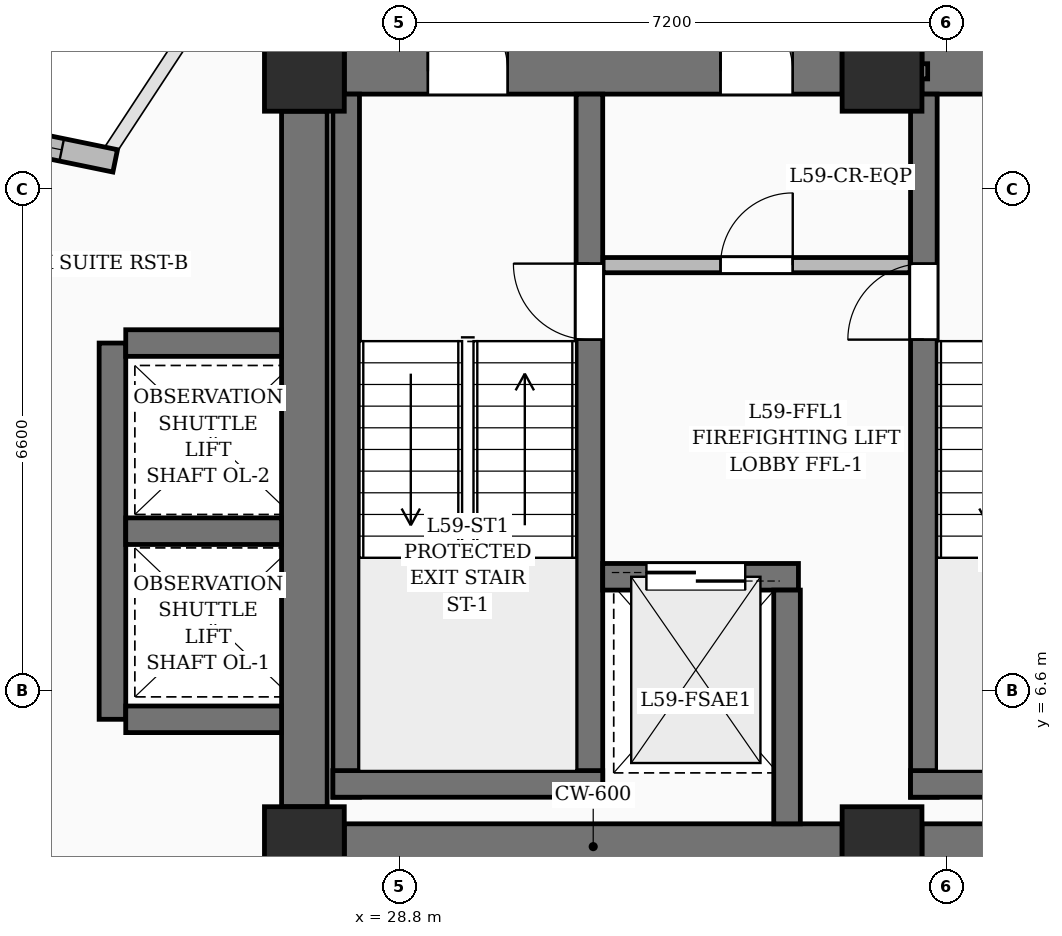
"""IFC4 building model, lengths in metres.
Left out: names, types, materials, properties, quantities, classifications, styles, units other than length and angle.
Written with IfcOpenShell. Run it as: python <this file> out.ifc"""

import sys

from ifc_helpers import new_model, si_unit, direction, frame, frame_2d, origin, origin_2d, place, context, subcontext, project, spatial, rectangle, extrude, element, fill, save


model = new_model("IFC4")
c1 = context("Model", 3, precision=1e-05, world=origin(), true_north=direction((0.0, 1.0)))
c2 = subcontext(c1, "Body", "Model", "MODEL_VIEW")
j1 = project(units=[si_unit("LENGTHUNIT", "METRE"), si_unit("PLANEANGLEUNIT", "RADIAN")], contexts=[c1])
p1 = place(None, origin())
s1 = spatial("IfcSite", under=j1, at=p1, CompositionType="ELEMENT")
p2 = place(p1, origin())
s2 = spatial("IfcBuilding", under=s1, at=p2, CompositionType="ELEMENT")
p3 = place(p2, frame((0.0, 0.0, 229.5)))
s3 = spatial("IfcBuildingStorey", under=s2, at=p3, CompositionType="ELEMENT", Elevation=229.5)
for number, where, z_axis, x_axis in (
    (1, (27.55, 4.55, 0.0), (0.0, 0.0, 1.0), (1.0, 0.0, 0.0)),
    (2, (35.15, 4.55, 0.0), (0.0, 0.0, 1.0), (1.0, 0.0, 0.0)),
    (3, (27.55, 14.75, 0.0), (0.0, 0.0, 1.0), (1.0, 0.0, 0.0)),
    (4, (35.15, 14.75, 0.0), (0.0, 0.0, 1.0), (1.0, 0.0, 0.0)),
):
    element("IfcColumn", number, at=place(p3, frame(where, z_axis=z_axis, x_axis=x_axis)), inside=s3, PredefinedType="COLUMN", context=c2, shape_type="SweptSolid", body=[
        extrude(rectangle(XDim=1.05, YDim=1.05, at=origin_2d()), origin(), (0.0, 0.0, 1.0), 3.75),
    ])
p4 = place(p3, frame((28.075, 4.55, 0.0), z_axis=(0.0, 0.0, 1.0), x_axis=(1.0, 0.0, 0.0)))
e5 = element("IfcWall", 5, at=p4, inside=s3, PredefinedType="SHEAR", context=c2, shape_type="SweptSolid", body=[
    extrude(rectangle(XDim=6.55, YDim=0.6, at=frame_2d((3.275, 0.0))), origin(), (0.0, 0.0, 1.0), 3.75),
])
p5 = place(p3, frame((35.675, 4.55, 0.0), z_axis=(0.0, 0.0, 1.0), x_axis=(1.0, 0.0, 0.0)))
e6 = element("IfcWall", 6, at=p5, inside=s3, PredefinedType="SHEAR", context=c2, shape_type="SweptSolid", body=[
    extrude(rectangle(XDim=10.85, YDim=0.6, at=frame_2d((5.425, 0.0))), origin(), (0.0, 0.0, 1.0), 3.75),
])
p6 = place(p3, frame((28.075, 14.75, 0.0), z_axis=(0.0, 0.0, 1.0), x_axis=(1.0, 0.0, 0.0)))
e7 = element("IfcWall", 7, at=p6, inside=s3, PredefinedType="SHEAR", context=c2, shape_type="SweptSolid", body=[
    extrude(rectangle(XDim=6.55, YDim=0.6, at=frame_2d((3.275, 0.0))), origin(), (0.0, 0.0, 1.0), 3.75),
])
p7 = place(p6, frame((1.1, 0.0, 0.0)))
e8 = element("IfcOpeningElement", 8, at=p7, cuts=e7, PredefinedType="OPENING", context=c2, shape_type="SweptSolid", body=[
    extrude(rectangle(XDim=1.05, YDim=2.15, at=frame_2d((0.525, 1.075))), frame((0.0, 0.31, 0.0), z_axis=(0.0, -1.0, 0.0), x_axis=(1.0, 0.0, 0.0)), (0.0, 0.0, 1.0), 0.62),
])
p8 = place(p6, frame((4.95, 0.0, 0.0)))
e9 = element("IfcOpeningElement", 9, at=p8, cuts=e7, PredefinedType="OPENING", context=c2, shape_type="SweptSolid", body=[
    extrude(rectangle(XDim=0.95, YDim=2.15, at=frame_2d((0.475, 1.075))), frame((0.0, 0.31, 0.0), z_axis=(0.0, -1.0, 0.0), x_axis=(1.0, 0.0, 0.0)), (0.0, 0.0, 1.0), 0.62),
])
p9 = place(p3, frame((35.675, 14.75, 0.0), z_axis=(0.0, 0.0, 1.0), x_axis=(1.0, 0.0, 0.0)))
e10 = element("IfcWall", 10, at=p9, inside=s3, PredefinedType="SHEAR", context=c2, shape_type="SweptSolid", body=[
    extrude(rectangle(XDim=10.85, YDim=0.6, at=frame_2d((5.425, 0.0))), origin(), (0.0, 0.0, 1.0), 3.75),
])
p10 = place(p9, frame((1.1, 0.0, 0.0)))
e11 = element("IfcOpeningElement", 11, at=p10, cuts=e10, PredefinedType="OPENING", context=c2, shape_type="SweptSolid", body=[
    extrude(rectangle(XDim=1.05, YDim=2.15, at=frame_2d((0.525, 1.075))), frame((0.0, 0.31, 0.0), z_axis=(0.0, -1.0, 0.0), x_axis=(1.0, 0.0, 0.0)), (0.0, 0.0, 1.0), 0.62),
])
p11 = place(p9, frame((8.7, 0.0, 0.0)))
e12 = element("IfcOpeningElement", 12, at=p11, cuts=e10, PredefinedType="OPENING", context=c2, shape_type="SweptSolid", body=[
    extrude(rectangle(XDim=1.05, YDim=2.15, at=frame_2d((0.525, 1.075))), frame((0.0, 0.31, 0.0), z_axis=(0.0, -1.0, 0.0), x_axis=(1.0, 0.0, 0.0)), (0.0, 0.0, 1.0), 0.62),
])
p12 = place(p9, frame((3.825, 0.0, 0.0)))
e13 = element("IfcOpeningElement", 13, at=p12, cuts=e10, PredefinedType="OPENING", context=c2, shape_type="SweptSolid", body=[
    extrude(rectangle(XDim=1.2, YDim=2.2, at=frame_2d((0.6, 1.1))), frame((0.0, 0.31, 0.0), z_axis=(0.0, -1.0, 0.0), x_axis=(1.0, 0.0, 0.0)), (0.0, 0.0, 1.0), 0.62),
])
p13 = place(p9, frame((5.825, 0.0, 0.0)))
e14 = element("IfcOpeningElement", 14, at=p13, cuts=e10, PredefinedType="OPENING", context=c2, shape_type="SweptSolid", body=[
    extrude(rectangle(XDim=1.2, YDim=2.2, at=frame_2d((0.6, 1.1))), frame((0.0, 0.31, 0.0), z_axis=(0.0, -1.0, 0.0), x_axis=(1.0, 0.0, 0.0)), (0.0, 0.0, 1.0), 0.62),
])
p14 = place(p3, frame((27.55, 5.075, 0.0), z_axis=(0.0, 0.0, 1.0), x_axis=(0.0, 1.0, 0.0)))
e15 = element("IfcWall", 15, at=p14, inside=s3, PredefinedType="SHEAR", context=c2, shape_type="SweptSolid", body=[
    extrude(rectangle(XDim=9.15, YDim=0.6, at=frame_2d((4.575, 0.0))), origin(), (0.0, 0.0, 1.0), 3.75),
])
p15 = place(p3, frame((28.1, 5.2, 0.0), z_axis=(0.0, 0.0, 1.0), x_axis=(0.0, 1.0, 0.0)))
e16 = element("IfcWall", 16, at=p15, inside=s3, PredefinedType="SOLIDWALL", context=c2, shape_type="SweptSolid", body=[
    extrude(rectangle(XDim=9.25, YDim=0.35, at=frame_2d((4.625, 0.0))), origin(), (0.0, 0.0, 1.0), 3.75),
])
p16 = place(p3, frame((31.3, 5.2, 0.0), z_axis=(0.0, 0.0, 1.0), x_axis=(0.0, 1.0, 0.0)))
e17 = element("IfcWall", 17, at=p16, inside=s3, PredefinedType="SOLIDWALL", context=c2, shape_type="SweptSolid", body=[
    extrude(rectangle(XDim=9.25, YDim=0.35, at=frame_2d((4.625, 0.0))), origin(), (0.0, 0.0, 1.0), 3.75),
])
p17 = place(p16, frame((6.02, 0.0, 0.0)))
e18 = element("IfcOpeningElement", 18, at=p17, cuts=e17, PredefinedType="OPENING", context=c2, shape_type="SweptSolid", body=[
    extrude(rectangle(XDim=1.0, YDim=2.15, at=frame_2d((0.5, 1.075))), frame((0.0, 0.185, 0.0), z_axis=(0.0, -1.0, 0.0), x_axis=(1.0, 0.0, 0.0)), (0.0, 0.0, 1.0), 0.37),
])
p18 = place(p3, frame((27.925, 5.375, 0.0), z_axis=(0.0, 0.0, 1.0), x_axis=(1.0, 0.0, 0.0)))
e19 = element("IfcWall", 19, at=p18, inside=s3, PredefinedType="SOLIDWALL", context=c2, shape_type="SweptSolid", body=[
    extrude(rectangle(XDim=3.55, YDim=0.35, at=frame_2d((1.775, 0.0))), origin(), (0.0, 0.0, 1.0), 3.75),
])
p19 = place(p3, frame((35.7, 5.2, 0.0), z_axis=(0.0, 0.0, 1.0), x_axis=(0.0, 1.0, 0.0)))
e20 = element("IfcWall", 20, at=p19, inside=s3, PredefinedType="SOLIDWALL", context=c2, shape_type="SweptSolid", body=[
    extrude(rectangle(XDim=9.25, YDim=0.35, at=frame_2d((4.625, 0.0))), origin(), (0.0, 0.0, 1.0), 3.75),
])
p20 = place(p19, frame((6.02, 0.0, 0.0)))
e21 = element("IfcOpeningElement", 21, at=p20, cuts=e20, PredefinedType="OPENING", context=c2, shape_type="SweptSolid", body=[
    extrude(rectangle(XDim=1.0, YDim=2.15, at=frame_2d((0.5, 1.075))), frame((0.0, 0.185, 0.0), z_axis=(0.0, -1.0, 0.0), x_axis=(1.0, 0.0, 0.0)), (0.0, 0.0, 1.0), 0.37),
])
p21 = place(p3, frame((35.525, 5.375, 0.0), z_axis=(0.0, 0.0, 1.0), x_axis=(1.0, 0.0, 0.0)))
e22 = element("IfcWall", 22, at=p21, inside=s3, PredefinedType="SOLIDWALL", context=c2, shape_type="SweptSolid", body=[
    extrude(rectangle(XDim=3.55, YDim=0.35, at=frame_2d((1.775, 0.0))), origin(), (0.0, 0.0, 1.0), 3.75),
])
p22 = place(p3, frame((31.475, 8.1, 0.0), z_axis=(0.0, 0.0, 1.0), x_axis=(1.0, 0.0, 0.0)))
e23 = element("IfcWall", 23, at=p22, inside=s3, PredefinedType="SOLIDWALL", context=c2, shape_type="SweptSolid", body=[
    extrude(rectangle(XDim=2.575, YDim=0.35, at=frame_2d((1.288, 0.0))), origin(), (0.0, 0.0, 1.0), 3.75),
])
p23 = place(p22, frame((0.575, 0.0, 0.0)))
e24 = element("IfcOpeningElement", 24, at=p23, cuts=e23, PredefinedType="OPENING", context=c2, shape_type="SweptSolid", body=[
    extrude(rectangle(XDim=1.3, YDim=2.25, at=frame_2d((0.65, 1.125))), frame((0.0, 0.185, 0.0), z_axis=(0.0, -1.0, 0.0), x_axis=(1.0, 0.0, 0.0)), (0.0, 0.0, 1.0), 0.37),
])
p24 = place(p3, frame((33.9, 4.85, 0.0), z_axis=(0.0, 0.0, 1.0), x_axis=(0.0, 1.0, 0.0)))
e25 = element("IfcWall", 25, at=p24, inside=s3, PredefinedType="SOLIDWALL", context=c2, shape_type="SweptSolid", body=[
    extrude(rectangle(XDim=3.075, YDim=0.35, at=frame_2d((1.538, 0.0))), origin(), (0.0, 0.0, 1.0), 3.75),
])
p25 = place(p3, frame((25.025, 6.225, 0.0), z_axis=(0.0, 0.0, 1.0), x_axis=(0.0, 1.0, 0.0)))
e26 = element("IfcWall", 26, at=p25, inside=s3, PredefinedType="SOLIDWALL", context=c2, shape_type="SweptSolid", body=[
    extrude(rectangle(XDim=4.95, YDim=0.35, at=frame_2d((2.475, 0.0))), origin(), (0.0, 0.0, 1.0), 3.75),
])
for number, where, z_axis, x_axis in (
    (27, (25.2, 6.225, 0.0), (0.0, 0.0, 1.0), (1.0, 0.0, 0.0)),
    (28, (25.2, 8.7, 0.0), (0.0, 0.0, 1.0), (1.0, 0.0, 0.0)),
    (29, (25.2, 11.175, 0.0), (0.0, 0.0, 1.0), (1.0, 0.0, 0.0)),
):
    element("IfcWall", number, at=place(p3, frame(where, z_axis=z_axis, x_axis=x_axis)), inside=s3, PredefinedType="SOLIDWALL", context=c2, shape_type="SweptSolid", body=[
        extrude(rectangle(XDim=2.05, YDim=0.35, at=frame_2d((1.025, 0.0))), origin(), (0.0, 0.0, 1.0), 3.75),
    ])
p26 = place(p3, frame((22.521, 14.094, 0.0), z_axis=(0.0, 0.0, 1.0), x_axis=(0.979494216194, -0.20147228207, 0.0)))
e30 = element("IfcWall", 30, at=p26, inside=s3, PredefinedType="SOLIDWALL", context=c2, shape_type="SweptSolid", body=[
    extrude(rectangle(XDim=2.593, YDim=0.3, at=frame_2d((1.297, 0.0))), origin(), (0.0, 0.0, 1.0), 2.825),
])
p27 = place(p26, frame((0.675, 0.0, 0.8)))
e31 = element("IfcOpeningElement", 31, at=p27, cuts=e30, PredefinedType="OPENING", context=c2, shape_type="SweptSolid", body=[
    extrude(rectangle(XDim=1.2, YDim=1.8, at=frame_2d((0.6, 0.9))), frame((0.0, 0.16, 0.0), z_axis=(0.0, -1.0, 0.0), x_axis=(1.0, 0.0, 0.0)), (0.0, 0.0, 1.0), 0.32),
])
p28 = place(p3, frame((34.72, 14.75, 0.0), z_axis=(0.0, 0.0, 1.0), x_axis=(1.0, 0.0, 0.0)))
e32 = element("IfcWall", 32, at=p28, inside=s3, PredefinedType="PARTITIONING", context=c2, shape_type="SweptSolid", body=[
    extrude(rectangle(XDim=1.03, YDim=0.2, at=frame_2d((0.515, 0.0))), origin(), (0.0, 0.0, 1.0), 2.685),
])
p29 = place(p3, frame((31.48, 12.2, 0.0), z_axis=(0.0, 0.0, 1.0), x_axis=(1.0, 0.0, 0.0)))
e33 = element("IfcWall", 33, at=p29, inside=s3, PredefinedType="PARTITIONING", context=c2, shape_type="SweptSolid", body=[
    extrude(rectangle(XDim=4.04, YDim=0.2, at=frame_2d((2.02, 0.0))), origin(), (0.0, 0.0, 1.0), 3.5),
])
p30 = place(p29, frame((1.545, 0.0, 0.0)))
e34 = element("IfcOpeningElement", 34, at=p30, cuts=e33, PredefinedType="OPENING", context=c2, shape_type="SweptSolid", body=[
    extrude(rectangle(XDim=0.95, YDim=2.15, at=frame_2d((0.475, 1.075))), frame((0.0, 0.11, 0.0), z_axis=(0.0, -1.0, 0.0), x_axis=(1.0, 0.0, 0.0)), (0.0, 0.0, 1.0), 0.22),
])
p31 = place(p27, origin())
e35 = element("IfcWindow", 35, at=p31, inside=s3, PartitioningType="SINGLE_PANEL", PredefinedType="WINDOW", context=c2, shape_type="SweptSolid", body=[
    extrude(rectangle(XDim=1.2, YDim=1.8, at=frame_2d((0.6, 0.9))), frame((0.0, 0.03, 0.0), z_axis=(0.0, -1.0, 0.0), x_axis=(1.0, 0.0, 0.0)), (0.0, 0.0, 1.0), 0.06),
])
fill(e31, e35)
p32 = place(p7, origin())
e36 = element("IfcDoor", 36, at=p32, inside=s3, OperationType="SINGLE_SWING_LEFT", PredefinedType="DOOR", context=c2, shape_type="SweptSolid", body=[
    extrude(rectangle(XDim=1.05, YDim=2.15, at=frame_2d((0.525, 1.075))), frame((0.0, 0.025, 0.0), z_axis=(0.0, -1.0, 0.0), x_axis=(1.0, 0.0, 0.0)), (0.0, 0.0, 1.0), 0.05),
])
fill(e8, e36)
p33 = place(p17, origin())
e37 = element("IfcDoor", 37, at=p33, inside=s3, OperationType="SINGLE_SWING_RIGHT", PredefinedType="DOOR", context=c2, shape_type="SweptSolid", body=[
    extrude(rectangle(XDim=1.0, YDim=2.15, at=frame_2d((0.5, 1.075))), frame((0.0, 0.025, 0.0), z_axis=(0.0, -1.0, 0.0), x_axis=(1.0, 0.0, 0.0)), (0.0, 0.0, 1.0), 0.05),
])
fill(e18, e37)
p34 = place(p20, origin())
e38 = element("IfcDoor", 38, at=p34, inside=s3, OperationType="SINGLE_SWING_LEFT", PredefinedType="DOOR", context=c2, shape_type="SweptSolid", body=[
    extrude(rectangle(XDim=1.0, YDim=2.15, at=frame_2d((0.5, 1.075))), frame((0.0, 0.025, 0.0), z_axis=(0.0, -1.0, 0.0), x_axis=(1.0, 0.0, 0.0)), (0.0, 0.0, 1.0), 0.05),
])
fill(e21, e38)
p35 = place(p23, origin())
e39 = element("IfcDoor", 39, at=p35, inside=s3, OperationType="DOUBLE_DOOR_SLIDING", PredefinedType="DOOR", context=c2, shape_type="SweptSolid", body=[
    extrude(rectangle(XDim=1.3, YDim=2.25, at=frame_2d((0.65, 1.125))), frame((0.0, 0.025, 0.0), z_axis=(0.0, -1.0, 0.0), x_axis=(1.0, 0.0, 0.0)), (0.0, 0.0, 1.0), 0.05),
])
fill(e24, e39)
p36 = place(p30, origin())
e40 = element("IfcDoor", 40, at=p36, inside=s3, OperationType="SINGLE_SWING_RIGHT", PredefinedType="DOOR", context=c2, shape_type="SweptSolid", body=[
    extrude(rectangle(XDim=0.95, YDim=2.15, at=frame_2d((0.475, 1.075))), frame((0.0, 0.025, 0.0), z_axis=(0.0, -1.0, 0.0), x_axis=(1.0, 0.0, 0.0)), (0.0, 0.0, 1.0), 0.05),
])
fill(e34, e40)
p37 = place(p8, origin())
e41 = element("IfcDoor", 41, at=p37, inside=s3, OperationType="SINGLE_SWING_LEFT", PredefinedType="DOOR", context=c2, shape_type="SweptSolid", body=[
    extrude(rectangle(XDim=0.95, YDim=2.15, at=frame_2d((0.475, 1.075))), frame((0.0, 0.025, 0.0), z_axis=(0.0, -1.0, 0.0), x_axis=(1.0, 0.0, 0.0)), (0.0, 0.0, 1.0), 0.05),
])
fill(e9, e41)
save(model, sys.argv[1])
